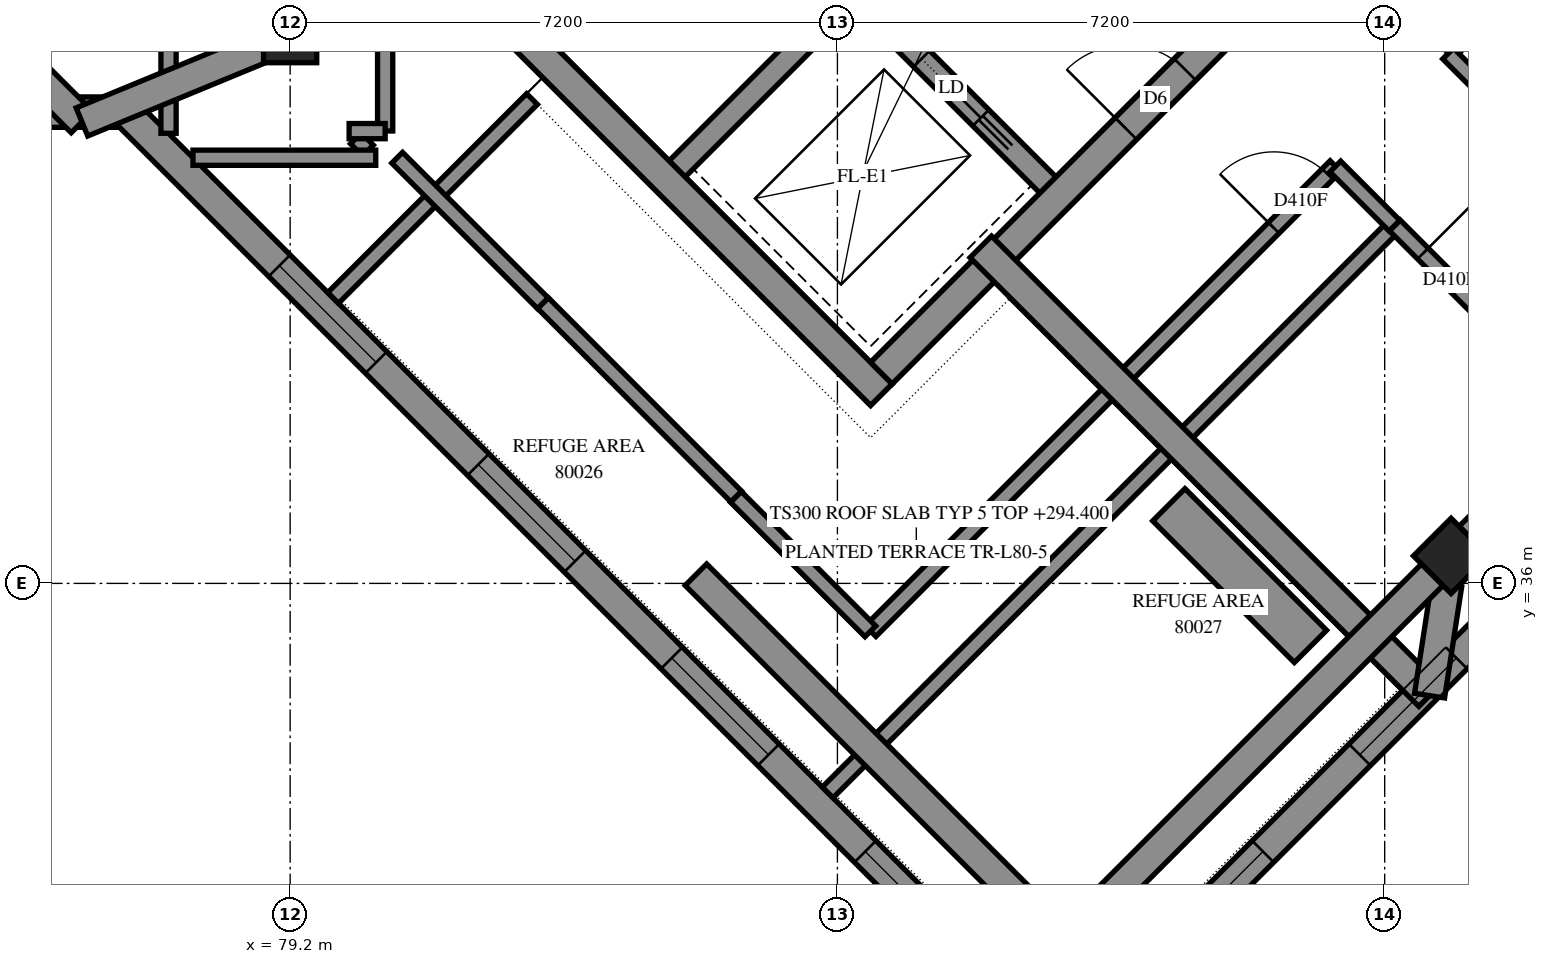
"""IFC4 building model, lengths in metres.
Left out: names, types, materials, properties, quantities, classifications, styles, units other than length and angle.
Written with IfcOpenShell. Run it as: python <this file> out.ifc"""

import sys

from ifc_helpers import new_model, si_unit, direction, frame, frame_2d, origin, origin_2d, place, context, subcontext, project, spatial, polyline, rectangle, outline, extrude, element, fill, save


model = new_model("IFC4")
c1 = context("Model", 3, precision=1e-05, world=origin(), true_north=direction((0.0, 1.0)))
c2 = subcontext(c1, "Body", "Model", "MODEL_VIEW")
j1 = project(units=[si_unit("LENGTHUNIT", "METRE"), si_unit("PLANEANGLEUNIT", "RADIAN")], contexts=[c1])
p1 = place(None, origin())
s1 = spatial("IfcSite", under=j1, at=p1, CompositionType="ELEMENT")
p2 = place(p1, origin())
s2 = spatial("IfcBuilding", under=s1, at=p2, CompositionType="ELEMENT")
p3 = place(p2, frame((0.0, 0.0, 294.4)))
s3 = spatial("IfcBuildingStorey", under=s2, at=p3, CompositionType="ELEMENT", Elevation=294.4)
for number, where, z_axis, x_axis in (
    (1, (79.2, 43.2, 0.0), (0.0, 0.0, 1.0), (1.0, 0.0, 0.0)),
    (2, (94.474, 36.362, 0.0), (0.0, 0.0, 1.0), (0.707, -0.707, 0.0)),
):
    element("IfcColumn", number, at=place(p3, frame(where, z_axis=z_axis, x_axis=x_axis)), inside=s3, PredefinedType="COLUMN", context=c2, shape_type="SweptSolid", body=[
        extrude(rectangle(XDim=0.7, YDim=0.7, at=origin_2d()), origin(), (0.0, 0.0, 1.0), 3.5),
    ])
p4 = place(p3, frame((76.23, 49.231, -0.3), z_axis=(0.0, 0.0, 1.0), x_axis=(0.7071034917, -0.7071100706, 0.0)))
e3 = element("IfcWall", 3, at=p4, inside=s3, PredefinedType="SHEAR", context=c2, shape_type="SweptSolid", body=[
    extrude(outline(polyline([(0.0, 0.0), (15.2, 0.0), (15.2, 3.1), (0.0, 3.1), (0.0, 0.0)])), frame((0.0, 0.2, 0.0), z_axis=(0.0, -1.0, 0.0), x_axis=(1.0, 0.0, 0.0)), (0.0, 0.0, 1.0), 0.4),
])
p5 = place(p3, frame((86.978, 38.766, -0.3), z_axis=(0.0, 0.0, 1.0), x_axis=(0.7071067812, 0.7071067812, 0.0)))
e4 = element("IfcWall", 4, at=p5, inside=s3, PredefinedType="SHEAR", context=c2, shape_type="SweptSolid", body=[
    extrude(outline(polyline([(0.0, 0.0), (14.4, 0.0), (14.4, 3.1), (0.0, 3.1), (0.0, 0.0)])), frame((0.0, 0.2, 0.0), z_axis=(0.0, -1.0, 0.0), x_axis=(1.0, 0.0, 0.0)), (0.0, 0.0, 1.0), 0.4),
])
p6 = place(p5, frame((4.55, 0.0, 0.3)))
e5 = element("IfcOpeningElement", 5, at=p6, cuts=e4, PredefinedType="OPENING", context=c2, shape_type="SweptSolid", body=[
    extrude(rectangle(XDim=1.1, YDim=2.1, at=frame_2d((0.55, 1.05))), frame((0.0, 0.21, 0.0), z_axis=(0.0, -1.0, 0.0), x_axis=(1.0, 0.0, 0.0)), (0.0, 0.0, 1.0), 0.42),
])
p7 = place(p5, frame((11.35, 0.0, 0.3)))
e6 = element("IfcOpeningElement", 6, at=p7, cuts=e4, PredefinedType="OPENING", context=c2, shape_type="SweptSolid", body=[
    extrude(rectangle(XDim=1.1, YDim=2.1, at=frame_2d((0.55, 1.05))), frame((0.0, 0.21, 0.0), z_axis=(0.0, -1.0, 0.0), x_axis=(1.0, 0.0, 0.0)), (0.0, 0.0, 1.0), 0.42),
])
p8 = place(p3, frame((84.291, 41.453, 0.0), z_axis=(0.0, 0.0, 1.0), x_axis=(0.7071067812, 0.7071067812, 0.0)))
e7 = element("IfcWall", 7, at=p8, inside=s3, PredefinedType="SOLIDWALL", context=c2, shape_type="SweptSolid", body=[
    extrude(outline(polyline([(0.0, 0.0), (3.3, 0.0), (3.3, 3.5), (0.0, 3.5), (0.0, 0.0)])), frame((0.0, 0.15, 0.0), z_axis=(0.0, -1.0, 0.0), x_axis=(1.0, 0.0, 0.0)), (0.0, 0.0, 1.0), 0.3),
])
p9 = place(p3, frame((78.988, 51.423, 0.0), z_axis=(0.0, 0.0, 1.0), x_axis=(0.7071067812, -0.7071067812, 0.0)))
e8 = element("IfcWall", 8, at=p9, inside=s3, PredefinedType="SOLIDWALL", context=c2, shape_type="SweptSolid", body=[
    extrude(outline(polyline([(0.0, 0.0), (14.4, 0.0), (14.4, 3.5), (0.0, 3.5), (0.0, 0.0)])), frame((0.0, 0.15, 0.0), z_axis=(0.0, -1.0, 0.0), x_axis=(1.0, 0.0, 0.0)), (0.0, 0.0, 1.0), 0.3),
])
p10 = place(p9, frame((12.05, 0.0, 0.0)))
e9 = element("IfcOpeningElement", 9, at=p10, cuts=e8, PredefinedType="OPENING", context=c2, shape_type="SweptSolid", body=[
    extrude(rectangle(XDim=1.1, YDim=2.1, at=frame_2d((0.55, 1.05))), frame((0.0, 0.16, 0.0), z_axis=(0.0, -1.0, 0.0), x_axis=(1.0, 0.0, 0.0)), (0.0, 0.0, 1.0), 0.32),
])
p11 = place(p3, frame((89.382, 29.856, 0.0), z_axis=(0.0, 0.0, 1.0), x_axis=(0.7071094407, 0.7071041216, 0.0)))
e10 = element("IfcWall", 10, at=p11, inside=s3, PredefinedType="SOLIDWALL", context=c2, shape_type="SweptSolid", body=[
    extrude(outline(polyline([(-0.2, -0.2), (19.0, -0.2), (18.6, 0.2), (0.2, 0.2), (-0.2, -0.2)])), origin(), (0.0, 0.0, 1.0), 3.5),
])
p12 = place(p11, frame((1.9, 0.0, 0.7)))
e11 = element("IfcOpeningElement", 11, at=p12, cuts=e10, PredefinedType="OPENING", context=c2, shape_type="SweptSolid", body=[
    extrude(rectangle(XDim=1.8, YDim=2.2, at=frame_2d((0.9, 1.1))), frame((0.0, 0.21, 0.0), z_axis=(0.0, -1.0, 0.0), x_axis=(1.0, 0.0, 0.0)), (0.0, 0.0, 1.0), 0.42),
])
p13 = place(p11, frame((5.5, 0.0, 0.7)))
e12 = element("IfcOpeningElement", 12, at=p13, cuts=e10, PredefinedType="OPENING", context=c2, shape_type="SweptSolid", body=[
    extrude(rectangle(XDim=1.8, YDim=2.2, at=frame_2d((0.9, 1.1))), frame((0.0, 0.21, 0.0), z_axis=(0.0, -1.0, 0.0), x_axis=(1.0, 0.0, 0.0)), (0.0, 0.0, 1.0), 0.42),
])
p14 = place(p11, frame((8.8, 0.0, 0.7)))
e13 = element("IfcOpeningElement", 13, at=p14, cuts=e10, PredefinedType="OPENING", context=c2, shape_type="SweptSolid", body=[
    extrude(rectangle(XDim=1.8, YDim=2.2, at=frame_2d((0.9, 1.1))), frame((0.0, 0.21, 0.0), z_axis=(0.0, -1.0, 0.0), x_axis=(1.0, 0.0, 0.0)), (0.0, 0.0, 1.0), 0.42),
])
p15 = place(p11, frame((12.95, 0.0, 0.7)))
e14 = element("IfcOpeningElement", 14, at=p15, cuts=e10, PredefinedType="OPENING", context=c2, shape_type="SweptSolid", body=[
    extrude(rectangle(XDim=1.8, YDim=2.2, at=frame_2d((0.9, 1.1))), frame((0.0, 0.21, 0.0), z_axis=(0.0, -1.0, 0.0), x_axis=(1.0, 0.0, 0.0)), (0.0, 0.0, 1.0), 0.42),
])
p16 = place(p11, frame((16.0, 0.0, 0.7)))
e15 = element("IfcOpeningElement", 15, at=p16, cuts=e10, PredefinedType="OPENING", context=c2, shape_type="SweptSolid", body=[
    extrude(rectangle(XDim=1.8, YDim=2.2, at=frame_2d((0.9, 1.1))), frame((0.0, 0.21, 0.0), z_axis=(0.0, -1.0, 0.0), x_axis=(1.0, 0.0, 0.0)), (0.0, 0.0, 1.0), 0.42),
])
p17 = place(p3, frame((71.0, 42.2, 0.0), z_axis=(0.0, 0.0, 1.0), x_axis=(1.0, 0.0, 0.0)))
e16 = element("IfcWall", 16, at=p17, inside=s3, PredefinedType="SOLIDWALL", context=c2, shape_type="SweptSolid", body=[
    extrude(outline(polyline([(-0.2, -0.2), (5.956, -0.2), (6.122, 0.2), (0.2, 0.2), (-0.2, -0.2)])), origin(), (0.0, 0.0, 1.0), 3.5),
])
p18 = place(p17, frame((1.9, 0.0, 0.7)))
e17 = element("IfcOpeningElement", 17, at=p18, cuts=e16, PredefinedType="OPENING", context=c2, shape_type="SweptSolid", body=[
    extrude(rectangle(XDim=1.8, YDim=2.2, at=frame_2d((0.9, 1.1))), frame((0.0, 0.21, 0.0), z_axis=(0.0, -1.0, 0.0), x_axis=(1.0, 0.0, 0.0)), (0.0, 0.0, 1.0), 0.42),
])
p19 = place(p3, frame((77.039, 42.2, 0.0), z_axis=(0.0, 0.0, 1.0), x_axis=(0.7071067812, -0.7071067812, 0.0)))
e18 = element("IfcWall", 18, at=p19, inside=s3, PredefinedType="SOLIDWALL", context=c2, shape_type="SweptSolid", body=[
    extrude(outline(polyline([(0.083, -0.2), (17.656, -0.2), (17.256, 0.2), (-0.083, 0.2), (0.083, -0.2)])), origin(), (0.0, 0.0, 1.0), 3.5),
])
p20 = place(p19, frame((2.857, 0.0, 0.7)))
e19 = element("IfcOpeningElement", 19, at=p20, cuts=e18, PredefinedType="OPENING", context=c2, shape_type="SweptSolid", body=[
    extrude(rectangle(XDim=1.8, YDim=2.2, at=frame_2d((0.9, 1.1))), frame((0.0, 0.21, 0.0), z_axis=(0.0, -1.0, 0.0), x_axis=(1.0, 0.0, 0.0)), (0.0, 0.0, 1.0), 0.42),
])
p21 = place(p19, frame((6.556, 0.0, 0.7)))
e20 = element("IfcOpeningElement", 20, at=p21, cuts=e18, PredefinedType="OPENING", context=c2, shape_type="SweptSolid", body=[
    extrude(rectangle(XDim=1.8, YDim=2.2, at=frame_2d((0.9, 1.1))), frame((0.0, 0.21, 0.0), z_axis=(0.0, -1.0, 0.0), x_axis=(1.0, 0.0, 0.0)), (0.0, 0.0, 1.0), 0.42),
])
p22 = place(p19, frame((10.156, 0.0, 0.7)))
e21 = element("IfcOpeningElement", 21, at=p22, cuts=e18, PredefinedType="OPENING", context=c2, shape_type="SweptSolid", body=[
    extrude(rectangle(XDim=1.8, YDim=2.2, at=frame_2d((0.9, 1.1))), frame((0.0, 0.21, 0.0), z_axis=(0.0, -1.0, 0.0), x_axis=(1.0, 0.0, 0.0)), (0.0, 0.0, 1.0), 0.42),
])
p23 = place(p19, frame((13.757, 0.0, 0.7)))
e22 = element("IfcOpeningElement", 22, at=p23, cuts=e18, PredefinedType="OPENING", context=c2, shape_type="SweptSolid", body=[
    extrude(rectangle(XDim=1.8, YDim=2.2, at=frame_2d((0.9, 1.1))), frame((0.0, 0.21, 0.0), z_axis=(0.0, -1.0, 0.0), x_axis=(1.0, 0.0, 0.0)), (0.0, 0.0, 1.0), 0.42),
])
p24 = place(p3, frame((93.908, 34.665, 0.0), z_axis=(0.0, 0.0, 1.0), x_axis=(-0.7071067812, 0.7071067812, 0.0)))
e23 = element("IfcWall", 23, at=p24, inside=s3, PredefinedType="PARAPET", context=c2, shape_type="SweptSolid", body=[
    extrude(outline(polyline([(0.0, -0.1), (7.3, -0.1), (7.3, 0.1), (0.0, 0.1), (0.0, -0.1)])), origin(), (0.0, 0.0, 1.0), 0.25),
])
p25 = place(p3, frame((82.382, 42.372, 0.0), z_axis=(0.0, 0.0, 1.0), x_axis=(-0.7071202943, -0.7070932678, 0.0)))
e24 = element("IfcWall", 24, at=p25, inside=s3, PredefinedType="PARAPET", context=c2, shape_type="SweptSolid", body=[
    extrude(outline(polyline([(0.0, -0.1), (3.7, -0.1), (3.7, 0.1), (0.0, 0.1), (0.0, -0.1)])), origin(), (0.0, 0.0, 1.0), 0.25),
])
p26 = place(p3, frame((86.836, 35.372, 0.0), z_axis=(0.0, 0.0, 1.0), x_axis=(0.7071067812, 0.7071067812, 0.0)))
e25 = element("IfcWall", 25, at=p26, inside=s3, PredefinedType="PARTITIONING", context=c2, shape_type="SweptSolid", body=[
    extrude(rectangle(XDim=8.651, YDim=0.2, at=frame_2d((4.325, 0.0))), origin(), (0.0, 0.0, 1.0), 3.5),
])
p27 = place(p26, frame((7.502, 0.0, 0.0)))
e26 = element("IfcOpeningElement", 26, at=p27, cuts=e25, PredefinedType="OPENING", context=c2, shape_type="SweptSolid", body=[
    extrude(rectangle(XDim=1.0, YDim=2.1, at=frame_2d((0.5, 1.05))), frame((0.0, 0.11, 0.0), z_axis=(0.0, -1.0, 0.0), x_axis=(1.0, 0.0, 0.0)), (0.0, 0.0, 1.0), 0.22),
])
p28 = place(p3, frame((94.438, 42.974, 0.0), z_axis=(0.0, 0.0, 1.0), x_axis=(0.7071067812, 0.7071067812, 0.0)))
e27 = element("IfcWall", 27, at=p28, inside=s3, PredefinedType="PARTITIONING", context=c2, shape_type="SweptSolid", body=[
    extrude(rectangle(XDim=8.649, YDim=0.2, at=frame_2d((4.325, 0.0))), origin(), (0.0, 0.0, 1.0), 3.5),
])
p29 = place(p28, frame((0.15, 0.0, 0.0)))
e28 = element("IfcOpeningElement", 28, at=p29, cuts=e27, PredefinedType="OPENING", context=c2, shape_type="SweptSolid", body=[
    extrude(rectangle(XDim=1.0, YDim=2.1, at=frame_2d((0.5, 1.05))), frame((0.0, 0.11, 0.0), z_axis=(0.0, -1.0, 0.0), x_axis=(1.0, 0.0, 0.0)), (0.0, 0.0, 1.0), 0.22),
])
p30 = place(p3, frame((89.031, 30.921, 0.0), z_axis=(0.0, 0.0, 1.0), x_axis=(0.7071067812, 0.7071067812, 0.0)))
e29 = element("IfcWall", 29, at=p30, inside=s3, PredefinedType="PARTITIONING", context=c2, shape_type="SweptSolid", body=[
    extrude(rectangle(XDim=8.191, YDim=0.2, at=frame_2d((4.096, 0.0))), origin(), (0.0, 0.0, 1.0), 3.5),
])
p31 = place(p3, frame((89.876, 36.858, 0.0), z_axis=(0.0, 0.0, 1.0), x_axis=(0.7071067812, 0.7071067812, 0.0)))
e30 = element("IfcWall", 30, at=p31, inside=s3, PredefinedType="PARTITIONING", context=c2, shape_type="SweptSolid", body=[
    extrude(rectangle(XDim=5.45, YDim=0.2, at=frame_2d((2.725, 0.0))), origin(), (0.0, 0.0, 1.0), 3.5),
])
p32 = place(p3, frame((94.434, 42.971, 0.0), z_axis=(0.0, 0.0, 1.0), x_axis=(0.7071067812, -0.7071067812, 0.0)))
e31 = element("IfcWall", 31, at=p32, inside=s3, PredefinedType="PARTITIONING", context=c2, shape_type="SweptSolid", body=[
    extrude(rectangle(XDim=4.701, YDim=0.2, at=frame_2d((2.35, 0.0))), origin(), (0.0, 0.0, 1.0), 3.5),
])
p33 = place(p32, frame((1.626, 0.0, 0.0)))
e32 = element("IfcOpeningElement", 32, at=p33, cuts=e31, PredefinedType="OPENING", context=c2, shape_type="SweptSolid", body=[
    extrude(rectangle(XDim=1.0, YDim=2.1, at=frame_2d((0.5, 1.05))), frame((0.0, 0.11, 0.0), z_axis=(0.0, -1.0, 0.0), x_axis=(1.0, 0.0, 0.0)), (0.0, 0.0, 1.0), 0.22),
])
p34 = place(p3, frame((93.732, 40.71, 0.0), z_axis=(0.0, 0.0, 1.0), x_axis=(0.7068288851, -0.7073845681, 0.0)))
e33 = element("IfcWall", 33, at=p34, inside=s3, PredefinedType="PARTITIONING", context=c2, shape_type="SweptSolid", body=[
    extrude(rectangle(XDim=3.599, YDim=0.2, at=frame_2d((1.8, 0.0))), origin(), (0.0, 0.0, 1.0), 3.5),
])
p35 = place(p34, frame((0.524, 0.0, 0.0)))
e34 = element("IfcOpeningElement", 34, at=p35, cuts=e33, PredefinedType="OPENING", context=c2, shape_type="SweptSolid", body=[
    extrude(rectangle(XDim=1.0, YDim=2.1, at=frame_2d((0.5, 1.05))), frame((0.0, 0.11, 0.0), z_axis=(0.0, -1.0, 0.0), x_axis=(1.0, 0.0, 0.0)), (0.0, 0.0, 1.0), 0.22),
])
p36 = place(p3, frame((82.526, 39.688, 0.0), z_axis=(0.0, 0.0, 1.0), x_axis=(0.7068288851, -0.7073845681, 0.0)))
e35 = element("IfcWall", 35, at=p36, inside=s3, PredefinedType="PARTITIONING", context=c2, shape_type="SweptSolid", body=[
    extrude(rectangle(XDim=3.599, YDim=0.2, at=frame_2d((1.8, 0.0))), origin(), (0.0, 0.0, 1.0), 3.5),
])
p37 = place(p3, frame((80.608, 41.6, 0.0), z_axis=(0.0, 0.0, 1.0), x_axis=(0.7074759311, -0.7067374385, 0.0)))
e36 = element("IfcWall", 36, at=p37, inside=s3, PredefinedType="PARTITIONING", context=c2, shape_type="SweptSolid", body=[
    extrude(rectangle(XDim=2.708, YDim=0.2, at=frame_2d((1.354, 0.0))), origin(), (0.0, 0.0, 1.0), 3.5),
])
p38 = place(p3, frame((85.065, 37.137, 0.0), z_axis=(0.0, 0.0, 1.0), x_axis=(0.7071067812, -0.7071067812, 0.0)))
e37 = element("IfcWall", 37, at=p38, inside=s3, PredefinedType="PARTITIONING", context=c2, shape_type="SweptSolid", body=[
    extrude(rectangle(XDim=2.5, YDim=0.2, at=frame_2d((1.25, 0.0))), origin(), (0.0, 0.0, 1.0), 3.5),
])
p39 = place(p3, frame((80.45, 41.952, 0.0), z_axis=(0.0, 0.0, 1.0), x_axis=(0.0, 1.0, 0.0)))
e38 = element("IfcWall", 38, at=p39, inside=s3, PredefinedType="PARTITIONING", context=c2, shape_type="SweptSolid", body=[
    extrude(rectangle(XDim=2.498, YDim=0.2, at=frame_2d((1.249, 0.0))), origin(), (0.0, 0.0, 1.0), 3.5),
])
p40 = place(p3, frame((92.951, 41.485, 0.0), z_axis=(0.0, 0.0, 1.0), x_axis=(0.7071067812, -0.7071067812, 0.0)))
e39 = element("IfcWall", 39, at=p40, inside=s3, PredefinedType="PARTITIONING", context=c2, shape_type="SweptSolid", body=[
    extrude(rectangle(XDim=1.1, YDim=0.2, at=frame_2d((0.55, 0.0))), origin(), (0.0, 0.0, 1.0), 3.5),
])
p41 = place(p3, frame((80.065, 41.855, 0.0), z_axis=(0.0, 0.0, 1.0), x_axis=(0.7071067812, -0.7071067812, 0.0)))
e40 = element("IfcWall", 40, at=p41, inside=s3, PredefinedType="PARTITIONING", context=c2, shape_type="SweptSolid", body=[
    extrude(rectangle(XDim=0.225, YDim=0.2, at=frame_2d((0.113, 0.0))), origin(), (0.0, 0.0, 1.0), 3.5),
])
p42 = place(p3, frame((79.976, 41.95, 0.0), z_axis=(0.0, 0.0, 1.0), x_axis=(1.0, 0.0, 0.0)))
e41 = element("IfcWall", 41, at=p42, inside=s3, PredefinedType="PARTITIONING", context=c2, shape_type="SweptSolid", body=[
    extrude(rectangle(XDim=0.474, YDim=0.2, at=frame_2d((0.237, 0.0))), origin(), (0.0, 0.0, 1.0), 3.5),
])
p43 = place(p3, frame((92.624, 35.171, 0.0), z_axis=(0.0, 0.0, 1.0), x_axis=(-0.7071067812, 0.7071067812, 0.0)))
e42 = element("IfcWall", 42, at=p43, inside=s3, PredefinedType="SOLIDWALL", context=c2, shape_type="SweptSolid", body=[
    extrude(outline(polyline([(0.0, -0.3), (2.635, -0.3), (2.635, 0.3), (0.0, 0.3), (0.0, -0.3)])), origin(), (0.0, 0.0, 1.0), 0.65),
])
p44 = place(p3, frame((86.272, 33.25, 0.0), z_axis=(0.0, 0.0, 1.0), x_axis=(0.7073028348, 0.7069106732, 0.0)))
e43 = element("IfcWall", 43, at=p44, inside=s3, PredefinedType="PARTITIONING", context=c2, shape_type="SweptSolid", body=[
    extrude(outline(polyline([(0.0, -0.1), (5.1, -0.1), (5.1, 0.1), (0.0, 0.1), (0.0, -0.1)])), origin(), (0.0, 0.0, 1.0), 3.5),
])
for number, where, z_axis, x_axis in (
    (44, (77.6, 41.922, 0.0), (0.0, 0.0, 1.0), (0.0, 1.0, 0.0)),
    (45, (77.922, 41.6, 0.0), (0.0, 0.0, 1.0), (1.0, 0.0, 0.0)),
):
    element("IfcWall", number, at=place(p3, frame(where, z_axis=z_axis, x_axis=x_axis)), inside=s3, PredefinedType="PARTITIONING", context=c2, shape_type="SweptSolid", body=[
        extrude(outline(polyline([(0.0, -0.1), (2.404, -0.1), (2.404, 0.1), (0.0, 0.1), (0.0, -0.1)])), origin(), (0.0, 0.0, 1.0), 3.5),
    ])
p45 = place(p12, origin())
e46 = element("IfcWindow", 46, at=p45, inside=s3, PartitioningType="SINGLE_PANEL", PredefinedType="WINDOW", context=c2, shape_type="SweptSolid", body=[
    extrude(rectangle(XDim=1.8, YDim=2.2, at=frame_2d((0.9, 1.1))), frame((0.0, 0.08, 0.0), z_axis=(0.0, -1.0, 0.0), x_axis=(1.0, 0.0, 0.0)), (0.0, 0.0, 1.0), 0.06),
])
fill(e11, e46)
p46 = place(p13, origin())
e47 = element("IfcWindow", 47, at=p46, inside=s3, PartitioningType="SINGLE_PANEL", PredefinedType="WINDOW", context=c2, shape_type="SweptSolid", body=[
    extrude(rectangle(XDim=1.8, YDim=2.2, at=frame_2d((0.9, 1.1))), frame((0.0, 0.08, 0.0), z_axis=(0.0, -1.0, 0.0), x_axis=(1.0, 0.0, 0.0)), (0.0, 0.0, 1.0), 0.06),
])
fill(e12, e47)
p47 = place(p20, origin())
e48 = element("IfcWindow", 48, at=p47, inside=s3, PartitioningType="SINGLE_PANEL", PredefinedType="WINDOW", context=c2, shape_type="SweptSolid", body=[
    extrude(rectangle(XDim=1.8, YDim=2.2, at=frame_2d((0.9, 1.1))), frame((0.0, 0.08, 0.0), z_axis=(0.0, -1.0, 0.0), x_axis=(1.0, 0.0, 0.0)), (0.0, 0.0, 1.0), 0.06),
])
fill(e19, e48)
p48 = place(p21, origin())
e49 = element("IfcWindow", 49, at=p48, inside=s3, PartitioningType="SINGLE_PANEL", PredefinedType="WINDOW", context=c2, shape_type="SweptSolid", body=[
    extrude(rectangle(XDim=1.8, YDim=2.2, at=frame_2d((0.9, 1.1))), frame((0.0, 0.08, 0.0), z_axis=(0.0, -1.0, 0.0), x_axis=(1.0, 0.0, 0.0)), (0.0, 0.0, 1.0), 0.06),
])
fill(e20, e49)
p49 = place(p22, origin())
e50 = element("IfcWindow", 50, at=p49, inside=s3, PartitioningType="SINGLE_PANEL", PredefinedType="WINDOW", context=c2, shape_type="SweptSolid", body=[
    extrude(rectangle(XDim=1.8, YDim=2.2, at=frame_2d((0.9, 1.1))), frame((0.0, 0.08, 0.0), z_axis=(0.0, -1.0, 0.0), x_axis=(1.0, 0.0, 0.0)), (0.0, 0.0, 1.0), 0.06),
])
fill(e21, e50)
p50 = place(p23, origin())
e51 = element("IfcWindow", 51, at=p50, inside=s3, PartitioningType="SINGLE_PANEL", PredefinedType="WINDOW", context=c2, shape_type="SweptSolid", body=[
    extrude(rectangle(XDim=1.8, YDim=2.2, at=frame_2d((0.9, 1.1))), frame((0.0, 0.08, 0.0), z_axis=(0.0, -1.0, 0.0), x_axis=(1.0, 0.0, 0.0)), (0.0, 0.0, 1.0), 0.06),
])
fill(e22, e51)
p51 = place(p6, origin())
e52 = element("IfcDoor", 52, at=p51, inside=s3, OperationType="DOUBLE_DOOR_SINGLE_SWING", PredefinedType="DOOR", context=c2, shape_type="SweptSolid", body=[
    extrude(rectangle(XDim=1.1, YDim=2.1, at=frame_2d((0.55, 1.05))), frame((0.0, 0.025, 0.0), z_axis=(0.0, -1.0, 0.0), x_axis=(1.0, 0.0, 0.0)), (0.0, 0.0, 1.0), 0.05),
])
fill(e5, e52)
p52 = place(p10, origin())
e53 = element("IfcDoor", 53, at=p52, inside=s3, OperationType="SLIDING_TO_RIGHT", PredefinedType="DOOR", context=c2, shape_type="SweptSolid", body=[
    extrude(rectangle(XDim=1.1, YDim=2.1, at=frame_2d((0.55, 1.05))), frame((0.0, 0.025, 0.0), z_axis=(0.0, -1.0, 0.0), x_axis=(1.0, 0.0, 0.0)), (0.0, 0.0, 1.0), 0.05),
])
fill(e9, e53)
p53 = place(p27, origin())
e54 = element("IfcDoor", 54, at=p53, inside=s3, OperationType="SINGLE_SWING_LEFT", PredefinedType="DOOR", context=c2, shape_type="SweptSolid", body=[
    extrude(rectangle(XDim=1.0, YDim=2.1, at=frame_2d((0.5, 1.05))), frame((0.0, 0.025, 0.0), z_axis=(0.0, -1.0, 0.0), x_axis=(1.0, 0.0, 0.0)), (0.0, 0.0, 1.0), 0.05),
])
fill(e26, e54)
p54 = place(p35, origin())
e55 = element("IfcDoor", 55, at=p54, inside=s3, OperationType="SINGLE_SWING_LEFT", PredefinedType="DOOR", context=c2, shape_type="SweptSolid", body=[
    extrude(rectangle(XDim=1.0, YDim=2.1, at=frame_2d((0.5, 1.05))), frame((0.0, 0.025, 0.0), z_axis=(0.0, -1.0, 0.0), x_axis=(1.0, 0.0, 0.0)), (0.0, 0.0, 1.0), 0.05),
])
fill(e34, e55)
save(model, sys.argv[1])
